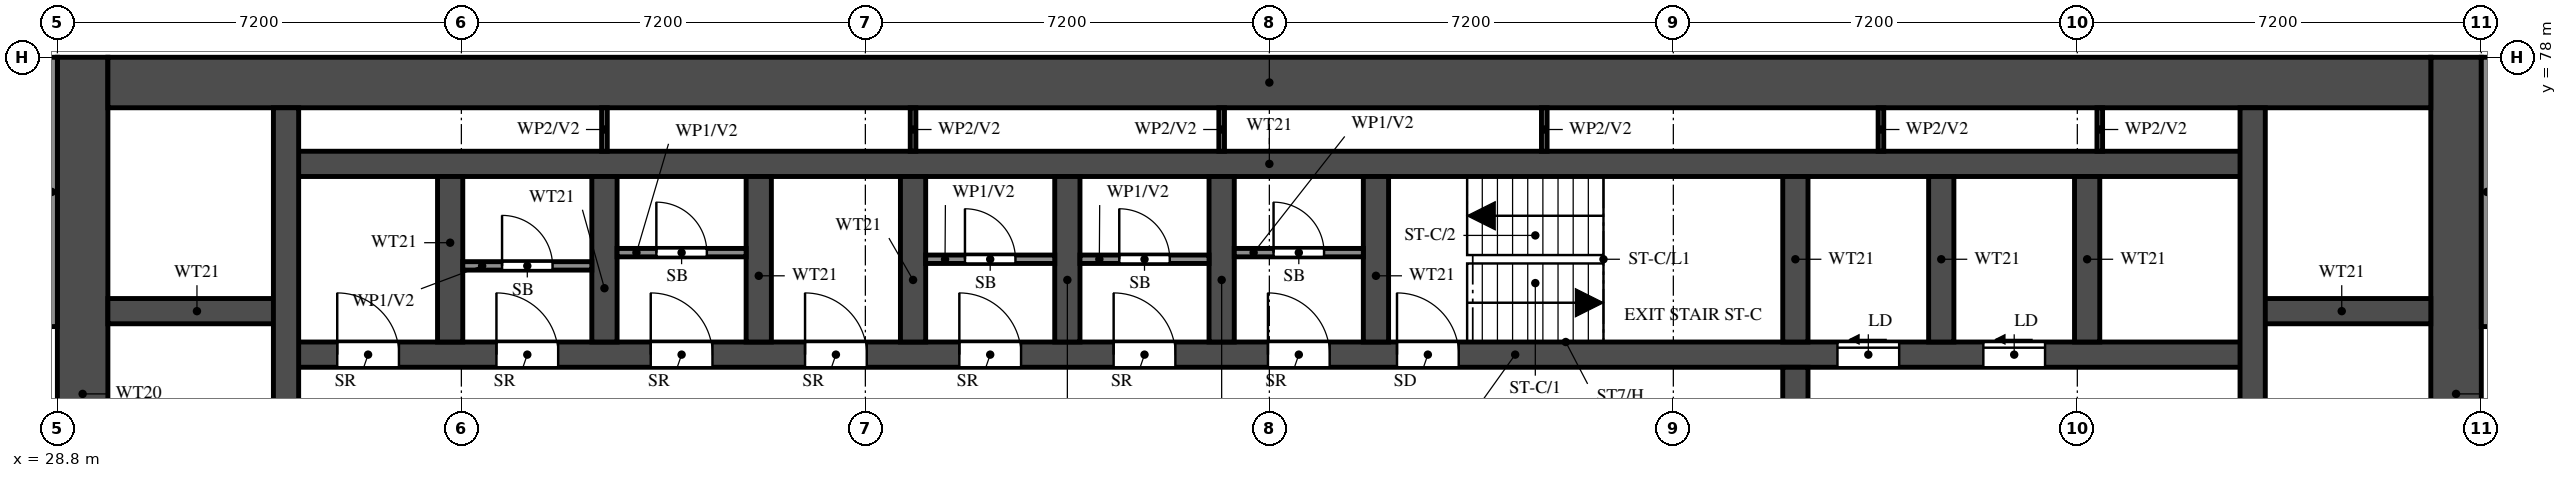
"""IFC4 building model, lengths in metres.
Left out: names, types, materials, properties, quantities, classifications, styles, units other than length and angle.
Written with IfcOpenShell. Run it as: python <this file> out.ifc"""

import sys

from ifc_helpers import new_model, si_unit, direction, frame, frame_2d, origin, place, context, subcontext, project, spatial, rectangle, extrude, element, fill, save


model = new_model("IFC4")
c1 = context("Model", 3, precision=1e-05, world=origin(), true_north=direction((0.0, 1.0)))
c2 = subcontext(c1, "Body", "Model", "MODEL_VIEW")
j1 = project(units=[si_unit("LENGTHUNIT", "METRE"), si_unit("PLANEANGLEUNIT", "RADIAN")], contexts=[c1])
p1 = place(None, origin())
s1 = spatial("IfcSite", under=j1, at=p1, CompositionType="ELEMENT")
p2 = place(p1, origin())
s2 = spatial("IfcBuilding", under=s1, at=p2, CompositionType="ELEMENT")
p3 = place(p2, frame((0.0, 0.0, 41.0)))
s3 = spatial("IfcBuildingStorey", under=s2, at=p3, CompositionType="ELEMENT", Elevation=41.0)
for number, where, z_axis, x_axis in (
    (1, (29.25, 66.0, 0.0), (0.0, 0.0, 1.0), (0.0, 1.0, 0.0)),
    (2, (71.55, 66.0, 0.0), (0.0, 0.0, 1.0), (0.0, 1.0, 0.0)),
):
    element("IfcWall", number, at=place(p3, frame(where, z_axis=z_axis, x_axis=x_axis)), inside=s3, PredefinedType="SHEAR", context=c2, shape_type="SweptSolid", body=[
        extrude(rectangle(XDim=12.0, YDim=0.9, at=frame_2d((6.0, 0.0))), origin(), (0.0, 0.0, 1.0), 3.18),
    ])
p4 = place(p3, frame((29.7, 77.55, 0.0), z_axis=(0.0, 0.0, 1.0), x_axis=(1.0, 0.0, 0.0)))
e3 = element("IfcWall", 3, at=p4, inside=s3, PredefinedType="SHEAR", context=c2, shape_type="SweptSolid", body=[
    extrude(rectangle(XDim=41.4, YDim=0.9, at=frame_2d((20.7, 0.0))), origin(), (0.0, 0.0, 1.0), 3.18),
])
p5 = place(p3, frame((32.875, 72.7, 0.0), z_axis=(0.0, 0.0, 1.0), x_axis=(1.0, 0.0, 0.0)))
e4 = element("IfcWall", 4, at=p5, inside=s3, PredefinedType="SHEAR", context=c2, shape_type="SweptSolid", body=[
    extrude(rectangle(XDim=35.05, YDim=0.45, at=frame_2d((17.525, 0.0))), origin(), (0.0, 0.0, 1.0), 3.18),
])
p6 = place(p5, frame((19.8, 0.0, 0.0)))
e5 = element("IfcOpeningElement", 5, at=p6, cuts=e4, PredefinedType="OPENING", context=c2, shape_type="SweptSolid", body=[
    extrude(rectangle(XDim=1.1, YDim=2.1, at=frame_2d((0.55, 1.05))), frame((0.0, 0.235, 0.0), z_axis=(0.0, -1.0, 0.0), x_axis=(1.0, 0.0, 0.0)), (0.0, 0.0, 1.0), 0.47),
])
p7 = place(p5, frame((27.65, 0.0, 0.0)))
e6 = element("IfcOpeningElement", 6, at=p7, cuts=e4, PredefinedType="OPENING", context=c2, shape_type="SweptSolid", body=[
    extrude(rectangle(XDim=1.1, YDim=2.1, at=frame_2d((0.55, 1.05))), frame((0.0, 0.235, 0.0), z_axis=(0.0, -1.0, 0.0), x_axis=(1.0, 0.0, 0.0)), (0.0, 0.0, 1.0), 0.47),
])
p8 = place(p5, frame((30.25, 0.0, 0.0)))
e7 = element("IfcOpeningElement", 7, at=p8, cuts=e4, PredefinedType="OPENING", context=c2, shape_type="SweptSolid", body=[
    extrude(rectangle(XDim=1.1, YDim=2.1, at=frame_2d((0.55, 1.05))), frame((0.0, 0.235, 0.0), z_axis=(0.0, -1.0, 0.0), x_axis=(1.0, 0.0, 0.0)), (0.0, 0.0, 1.0), 0.47),
])
p9 = place(p5, frame((3.75, 0.0, 0.0)))
e8 = element("IfcOpeningElement", 8, at=p9, cuts=e4, PredefinedType="OPENING", context=c2, shape_type="SweptSolid", body=[
    extrude(rectangle(XDim=1.1, YDim=2.1, at=frame_2d((0.55, 1.05))), frame((0.0, 0.235, 0.0), z_axis=(0.0, -1.0, 0.0), x_axis=(1.0, 0.0, 0.0)), (0.0, 0.0, 1.0), 0.47),
])
p10 = place(p5, frame((6.5, 0.0, 0.0)))
e9 = element("IfcOpeningElement", 9, at=p10, cuts=e4, PredefinedType="OPENING", context=c2, shape_type="SweptSolid", body=[
    extrude(rectangle(XDim=1.1, YDim=2.1, at=frame_2d((0.55, 1.05))), frame((0.0, 0.235, 0.0), z_axis=(0.0, -1.0, 0.0), x_axis=(1.0, 0.0, 0.0)), (0.0, 0.0, 1.0), 0.47),
])
p11 = place(p5, frame((9.25, 0.0, 0.0)))
e10 = element("IfcOpeningElement", 10, at=p11, cuts=e4, PredefinedType="OPENING", context=c2, shape_type="SweptSolid", body=[
    extrude(rectangle(XDim=1.1, YDim=2.1, at=frame_2d((0.55, 1.05))), frame((0.0, 0.235, 0.0), z_axis=(0.0, -1.0, 0.0), x_axis=(1.0, 0.0, 0.0)), (0.0, 0.0, 1.0), 0.47),
])
p12 = place(p5, frame((12.0, 0.0, 0.0)))
e11 = element("IfcOpeningElement", 11, at=p12, cuts=e4, PredefinedType="OPENING", context=c2, shape_type="SweptSolid", body=[
    extrude(rectangle(XDim=1.1, YDim=2.1, at=frame_2d((0.55, 1.05))), frame((0.0, 0.235, 0.0), z_axis=(0.0, -1.0, 0.0), x_axis=(1.0, 0.0, 0.0)), (0.0, 0.0, 1.0), 0.47),
])
p13 = place(p5, frame((14.75, 0.0, 0.0)))
e12 = element("IfcOpeningElement", 12, at=p13, cuts=e4, PredefinedType="OPENING", context=c2, shape_type="SweptSolid", body=[
    extrude(rectangle(XDim=1.1, YDim=2.1, at=frame_2d((0.55, 1.05))), frame((0.0, 0.235, 0.0), z_axis=(0.0, -1.0, 0.0), x_axis=(1.0, 0.0, 0.0)), (0.0, 0.0, 1.0), 0.47),
])
p14 = place(p5, frame((17.5, 0.0, 0.0)))
e13 = element("IfcOpeningElement", 13, at=p14, cuts=e4, PredefinedType="OPENING", context=c2, shape_type="SweptSolid", body=[
    extrude(rectangle(XDim=1.1, YDim=2.1, at=frame_2d((0.55, 1.05))), frame((0.0, 0.235, 0.0), z_axis=(0.0, -1.0, 0.0), x_axis=(1.0, 0.0, 0.0)), (0.0, 0.0, 1.0), 0.47),
])
p15 = place(p5, frame((0.913, 0.0, 0.0)))
e14 = element("IfcOpeningElement", 14, at=p15, cuts=e4, PredefinedType="OPENING", context=c2, shape_type="SweptSolid", body=[
    extrude(rectangle(XDim=1.1, YDim=2.1, at=frame_2d((0.55, 1.05))), frame((0.0, 0.235, 0.0), z_axis=(0.0, -1.0, 0.0), x_axis=(1.0, 0.0, 0.0)), (0.0, 0.0, 1.0), 0.47),
])
p16 = place(p3, frame((32.875, 76.1, 0.0), z_axis=(0.0, 0.0, 1.0), x_axis=(1.0, 0.0, 0.0)))
e15 = element("IfcWall", 15, at=p16, inside=s3, PredefinedType="SHEAR", context=c2, shape_type="SweptSolid", body=[
    extrude(rectangle(XDim=35.05, YDim=0.45, at=frame_2d((17.525, 0.0))), origin(), (0.0, 0.0, 1.0), 3.18),
])
for number, where, z_axis, x_axis in (
    (16, (29.7, 73.475, 0.0), (0.0, 0.0, 1.0), (1.0, 0.0, 0.0)),
    (17, (67.925, 73.475, 0.0), (0.0, 0.0, 1.0), (1.0, 0.0, 0.0)),
):
    element("IfcWall", number, at=place(p3, frame(where, z_axis=z_axis, x_axis=x_axis)), inside=s3, PredefinedType="SHEAR", context=c2, shape_type="SweptSolid", body=[
        extrude(rectangle(XDim=3.175, YDim=0.45, at=frame_2d((1.587, 0.0))), origin(), (0.0, 0.0, 1.0), 3.18),
    ])
p17 = place(p3, frame((32.875, 66.45, 0.0), z_axis=(0.0, 0.0, 1.0), x_axis=(0.0, 1.0, 0.0)))
e18 = element("IfcWall", 18, at=p17, inside=s3, PredefinedType="SHEAR", context=c2, shape_type="SweptSolid", body=[
    extrude(rectangle(XDim=10.65, YDim=0.45, at=frame_2d((5.325, 0.0))), origin(), (0.0, 0.0, 1.0), 3.18),
])
p18 = place(p3, frame((67.925, 66.45, 0.0), z_axis=(0.0, 0.0, 1.0), x_axis=(0.0, 1.0, 0.0)))
e19 = element("IfcWall", 19, at=p18, inside=s3, PredefinedType="SHEAR", context=c2, shape_type="SweptSolid", body=[
    extrude(rectangle(XDim=10.65, YDim=0.45, at=frame_2d((5.325, 0.0))), origin(), (0.0, 0.0, 1.0), 3.18),
])
p19 = place(p18, frame((0.15, 0.0, 0.0)))
e20 = element("IfcOpeningElement", 20, at=p19, cuts=e19, PredefinedType="OPENING", context=c2, shape_type="SweptSolid", body=[
    extrude(rectangle(XDim=1.1, YDim=2.1, at=frame_2d((0.55, 1.05))), frame((0.0, 0.235, 0.0), z_axis=(0.0, -1.0, 0.0), x_axis=(1.0, 0.0, 0.0)), (0.0, 0.0, 1.0), 0.47),
])
p20 = place(p3, frame((59.775, 66.45, 0.0), z_axis=(0.0, 0.0, 1.0), x_axis=(0.0, 1.0, 0.0)))
e21 = element("IfcWall", 21, at=p20, inside=s3, PredefinedType="SHEAR", context=c2, shape_type="SweptSolid", body=[
    extrude(rectangle(XDim=6.025, YDim=0.45, at=frame_2d((3.013, 0.0))), origin(), (0.0, 0.0, 1.0), 3.18),
])
p21 = place(p20, frame((3.85, 0.0, 0.0)))
e22 = element("IfcOpeningElement", 22, at=p21, cuts=e21, PredefinedType="OPENING", context=c2, shape_type="SweptSolid", body=[
    extrude(rectangle(XDim=1.2, YDim=2.1, at=frame_2d((0.6, 1.05))), frame((0.0, 0.235, 0.0), z_axis=(0.0, -1.0, 0.0), x_axis=(1.0, 0.0, 0.0)), (0.0, 0.0, 1.0), 0.47),
])
for number, where, z_axis, x_axis in (
    (23, (59.775, 72.925, 0.0), (0.0, 0.0, 1.0), (0.0, 1.0, 0.0)),
    (24, (35.8, 72.925, 0.0), (0.0, 0.0, 1.0), (0.0, 1.0, 0.0)),
    (25, (38.55, 72.925, 0.0), (0.0, 0.0, 1.0), (0.0, 1.0, 0.0)),
    (26, (41.3, 72.925, 0.0), (0.0, 0.0, 1.0), (0.0, 1.0, 0.0)),
    (27, (44.05, 72.925, 0.0), (0.0, 0.0, 1.0), (0.0, 1.0, 0.0)),
    (28, (46.8, 72.925, 0.0), (0.0, 0.0, 1.0), (0.0, 1.0, 0.0)),
    (29, (49.55, 72.925, 0.0), (0.0, 0.0, 1.0), (0.0, 1.0, 0.0)),
    (30, (52.3, 72.925, 0.0), (0.0, 0.0, 1.0), (0.0, 1.0, 0.0)),
    (31, (62.375, 72.925, 0.0), (0.0, 0.0, 1.0), (0.0, 1.0, 0.0)),
    (32, (64.975, 72.925, 0.0), (0.0, 0.0, 1.0), (0.0, 1.0, 0.0)),
):
    element("IfcWall", number, at=place(p3, frame(where, z_axis=z_axis, x_axis=x_axis)), inside=s3, PredefinedType="SHEAR", context=c2, shape_type="SweptSolid", body=[
        extrude(rectangle(XDim=2.95, YDim=0.45, at=frame_2d((1.475, 0.0))), origin(), (0.0, 0.0, 1.0), 3.18),
    ])
p22 = place(p3, frame((36.025, 74.282, 0.0), z_axis=(0.0, 0.0, 1.0), x_axis=(1.0, 0.0, 0.0)))
e33 = element("IfcWall", 33, at=p22, inside=s3, PredefinedType="PARTITIONING", context=c2, shape_type="SweptSolid", body=[
    extrude(rectangle(XDim=2.3, YDim=0.15, at=frame_2d((1.15, 0.0))), origin(), (0.0, 0.0, 1.0), 3.18),
])
p23 = place(p22, frame((0.7, 0.0, 0.0)))
e34 = element("IfcOpeningElement", 34, at=p23, cuts=e33, PredefinedType="OPENING", context=c2, shape_type="SweptSolid", body=[
    extrude(rectangle(XDim=0.9, YDim=2.1, at=frame_2d((0.45, 1.05))), frame((0.0, 0.085, 0.0), z_axis=(0.0, -1.0, 0.0), x_axis=(1.0, 0.0, 0.0)), (0.0, 0.0, 1.0), 0.17),
])
p24 = place(p3, frame((38.775, 74.518, 0.0), z_axis=(0.0, 0.0, 1.0), x_axis=(1.0, 0.0, 0.0)))
e35 = element("IfcWall", 35, at=p24, inside=s3, PredefinedType="PARTITIONING", context=c2, shape_type="SweptSolid", body=[
    extrude(rectangle(XDim=2.3, YDim=0.15, at=frame_2d((1.15, 0.0))), origin(), (0.0, 0.0, 1.0), 3.18),
])
p25 = place(p24, frame((0.7, 0.0, 0.0)))
e36 = element("IfcOpeningElement", 36, at=p25, cuts=e35, PredefinedType="OPENING", context=c2, shape_type="SweptSolid", body=[
    extrude(rectangle(XDim=0.9, YDim=2.1, at=frame_2d((0.45, 1.05))), frame((0.0, 0.085, 0.0), z_axis=(0.0, -1.0, 0.0), x_axis=(1.0, 0.0, 0.0)), (0.0, 0.0, 1.0), 0.17),
])
p26 = place(p3, frame((44.275, 74.4, 0.0), z_axis=(0.0, 0.0, 1.0), x_axis=(1.0, 0.0, 0.0)))
e37 = element("IfcWall", 37, at=p26, inside=s3, PredefinedType="PARTITIONING", context=c2, shape_type="SweptSolid", body=[
    extrude(rectangle(XDim=2.3, YDim=0.15, at=frame_2d((1.15, 0.0))), origin(), (0.0, 0.0, 1.0), 3.18),
])
p27 = place(p26, frame((0.7, 0.0, 0.0)))
e38 = element("IfcOpeningElement", 38, at=p27, cuts=e37, PredefinedType="OPENING", context=c2, shape_type="SweptSolid", body=[
    extrude(rectangle(XDim=0.9, YDim=2.1, at=frame_2d((0.45, 1.05))), frame((0.0, 0.085, 0.0), z_axis=(0.0, -1.0, 0.0), x_axis=(1.0, 0.0, 0.0)), (0.0, 0.0, 1.0), 0.17),
])
p28 = place(p3, frame((47.025, 74.4, 0.0), z_axis=(0.0, 0.0, 1.0), x_axis=(1.0, 0.0, 0.0)))
e39 = element("IfcWall", 39, at=p28, inside=s3, PredefinedType="PARTITIONING", context=c2, shape_type="SweptSolid", body=[
    extrude(rectangle(XDim=2.3, YDim=0.15, at=frame_2d((1.15, 0.0))), origin(), (0.0, 0.0, 1.0), 3.18),
])
p29 = place(p28, frame((0.7, 0.0, 0.0)))
e40 = element("IfcOpeningElement", 40, at=p29, cuts=e39, PredefinedType="OPENING", context=c2, shape_type="SweptSolid", body=[
    extrude(rectangle(XDim=0.9, YDim=2.1, at=frame_2d((0.45, 1.05))), frame((0.0, 0.085, 0.0), z_axis=(0.0, -1.0, 0.0), x_axis=(1.0, 0.0, 0.0)), (0.0, 0.0, 1.0), 0.17),
])
p30 = place(p3, frame((49.775, 74.518, 0.0), z_axis=(0.0, 0.0, 1.0), x_axis=(1.0, 0.0, 0.0)))
e41 = element("IfcWall", 41, at=p30, inside=s3, PredefinedType="PARTITIONING", context=c2, shape_type="SweptSolid", body=[
    extrude(rectangle(XDim=2.3, YDim=0.15, at=frame_2d((1.15, 0.0))), origin(), (0.0, 0.0, 1.0), 3.18),
])
p31 = place(p30, frame((0.7, 0.0, 0.0)))
e42 = element("IfcOpeningElement", 42, at=p31, cuts=e41, PredefinedType="OPENING", context=c2, shape_type="SweptSolid", body=[
    extrude(rectangle(XDim=0.9, YDim=2.1, at=frame_2d((0.45, 1.05))), frame((0.0, 0.085, 0.0), z_axis=(0.0, -1.0, 0.0), x_axis=(1.0, 0.0, 0.0)), (0.0, 0.0, 1.0), 0.17),
])
for number, where, z_axis, x_axis in (
    (43, (38.55, 76.325, 0.0), (0.0, 0.0, 1.0), (0.0, 1.0, 0.0)),
    (44, (44.05, 76.325, 0.0), (0.0, 0.0, 1.0), (0.0, 1.0, 0.0)),
    (45, (49.55, 76.325, 0.0), (0.0, 0.0, 1.0), (0.0, 1.0, 0.0)),
    (46, (55.3, 76.325, 0.0), (0.0, 0.0, 1.0), (0.0, 1.0, 0.0)),
    (47, (61.3, 76.325, 0.0), (0.0, 0.0, 1.0), (0.0, 1.0, 0.0)),
    (48, (65.2, 76.325, 0.0), (0.0, 0.0, 1.0), (0.0, 1.0, 0.0)),
):
    element("IfcWall", number, at=place(p3, frame(where, z_axis=z_axis, x_axis=x_axis)), inside=s3, PredefinedType="PARTITIONING", context=c2, shape_type="SweptSolid", body=[
        extrude(rectangle(XDim=0.775, YDim=0.1, at=frame_2d((0.388, 0.0))), origin(), (0.0, 0.0, 1.0), 3.18),
    ])
for number, where, z_axis, x_axis in (
    (49, (28.7, 73.2, 0.0), (0.0, 0.0, 1.0), (0.0, 1.0, 0.0)),
    (50, (72.1, 73.2, 0.0), (0.0, 0.0, 1.0), (0.0, 1.0, 0.0)),
):
    element("IfcWall", number, at=place(p3, frame(where, z_axis=z_axis, x_axis=x_axis)), inside=s3, PredefinedType="SOLIDWALL", context=c2, shape_type="SweptSolid", body=[
        extrude(rectangle(XDim=4.8, YDim=0.2, at=frame_2d((2.4, 0.0))), origin(), (0.0, 0.0, 1.0), 3.18),
    ])
p32 = place(p6, origin())
e51 = element("IfcDoor", 51, at=p32, inside=s3, OperationType="SINGLE_SWING_LEFT", PredefinedType="DOOR", context=c2, shape_type="SweptSolid", body=[
    extrude(rectangle(XDim=1.1, YDim=2.1, at=frame_2d((0.55, 1.05))), frame((0.0, 0.025, 0.0), z_axis=(0.0, -1.0, 0.0), x_axis=(1.0, 0.0, 0.0)), (0.0, 0.0, 1.0), 0.05),
])
fill(e5, e51)
p33 = place(p7, origin())
e52 = element("IfcDoor", 52, at=p33, inside=s3, OperationType="SLIDING_TO_LEFT", PredefinedType="DOOR", context=c2, shape_type="SweptSolid", body=[
    extrude(rectangle(XDim=1.1, YDim=2.1, at=frame_2d((0.55, 1.05))), frame((0.0, 0.025, 0.0), z_axis=(0.0, -1.0, 0.0), x_axis=(1.0, 0.0, 0.0)), (0.0, 0.0, 1.0), 0.05),
])
fill(e6, e52)
p34 = place(p8, origin())
e53 = element("IfcDoor", 53, at=p34, inside=s3, OperationType="SLIDING_TO_LEFT", PredefinedType="DOOR", context=c2, shape_type="SweptSolid", body=[
    extrude(rectangle(XDim=1.1, YDim=2.1, at=frame_2d((0.55, 1.05))), frame((0.0, 0.025, 0.0), z_axis=(0.0, -1.0, 0.0), x_axis=(1.0, 0.0, 0.0)), (0.0, 0.0, 1.0), 0.05),
])
fill(e7, e53)
p35 = place(p9, origin())
e54 = element("IfcDoor", 54, at=p35, inside=s3, OperationType="SINGLE_SWING_LEFT", PredefinedType="DOOR", context=c2, shape_type="SweptSolid", body=[
    extrude(rectangle(XDim=1.1, YDim=2.1, at=frame_2d((0.55, 1.05))), frame((0.0, 0.025, 0.0), z_axis=(0.0, -1.0, 0.0), x_axis=(1.0, 0.0, 0.0)), (0.0, 0.0, 1.0), 0.05),
])
fill(e8, e54)
p36 = place(p23, origin())
e55 = element("IfcDoor", 55, at=p36, inside=s3, OperationType="SINGLE_SWING_LEFT", PredefinedType="DOOR", context=c2, shape_type="SweptSolid", body=[
    extrude(rectangle(XDim=0.9, YDim=2.1, at=frame_2d((0.45, 1.05))), frame((0.0, 0.025, 0.0), z_axis=(0.0, -1.0, 0.0), x_axis=(1.0, 0.0, 0.0)), (0.0, 0.0, 1.0), 0.05),
])
fill(e34, e55)
p37 = place(p10, origin())
e56 = element("IfcDoor", 56, at=p37, inside=s3, OperationType="SINGLE_SWING_LEFT", PredefinedType="DOOR", context=c2, shape_type="SweptSolid", body=[
    extrude(rectangle(XDim=1.1, YDim=2.1, at=frame_2d((0.55, 1.05))), frame((0.0, 0.025, 0.0), z_axis=(0.0, -1.0, 0.0), x_axis=(1.0, 0.0, 0.0)), (0.0, 0.0, 1.0), 0.05),
])
fill(e9, e56)
p38 = place(p25, origin())
e57 = element("IfcDoor", 57, at=p38, inside=s3, OperationType="SINGLE_SWING_LEFT", PredefinedType="DOOR", context=c2, shape_type="SweptSolid", body=[
    extrude(rectangle(XDim=0.9, YDim=2.1, at=frame_2d((0.45, 1.05))), frame((0.0, 0.025, 0.0), z_axis=(0.0, -1.0, 0.0), x_axis=(1.0, 0.0, 0.0)), (0.0, 0.0, 1.0), 0.05),
])
fill(e36, e57)
p39 = place(p11, origin())
e58 = element("IfcDoor", 58, at=p39, inside=s3, OperationType="SINGLE_SWING_LEFT", PredefinedType="DOOR", context=c2, shape_type="SweptSolid", body=[
    extrude(rectangle(XDim=1.1, YDim=2.1, at=frame_2d((0.55, 1.05))), frame((0.0, 0.025, 0.0), z_axis=(0.0, -1.0, 0.0), x_axis=(1.0, 0.0, 0.0)), (0.0, 0.0, 1.0), 0.05),
])
fill(e10, e58)
p40 = place(p12, origin())
e59 = element("IfcDoor", 59, at=p40, inside=s3, OperationType="SINGLE_SWING_LEFT", PredefinedType="DOOR", context=c2, shape_type="SweptSolid", body=[
    extrude(rectangle(XDim=1.1, YDim=2.1, at=frame_2d((0.55, 1.05))), frame((0.0, 0.025, 0.0), z_axis=(0.0, -1.0, 0.0), x_axis=(1.0, 0.0, 0.0)), (0.0, 0.0, 1.0), 0.05),
])
fill(e11, e59)
p41 = place(p27, origin())
e60 = element("IfcDoor", 60, at=p41, inside=s3, OperationType="SINGLE_SWING_RIGHT", PredefinedType="DOOR", context=c2, shape_type="SweptSolid", body=[
    extrude(rectangle(XDim=0.9, YDim=2.1, at=frame_2d((0.45, 1.05))), frame((0.0, 0.025, 0.0), z_axis=(0.0, -1.0, 0.0), x_axis=(1.0, 0.0, 0.0)), (0.0, 0.0, 1.0), 0.05),
])
fill(e38, e60)
p42 = place(p13, origin())
e61 = element("IfcDoor", 61, at=p42, inside=s3, OperationType="SINGLE_SWING_LEFT", PredefinedType="DOOR", context=c2, shape_type="SweptSolid", body=[
    extrude(rectangle(XDim=1.1, YDim=2.1, at=frame_2d((0.55, 1.05))), frame((0.0, 0.025, 0.0), z_axis=(0.0, -1.0, 0.0), x_axis=(1.0, 0.0, 0.0)), (0.0, 0.0, 1.0), 0.05),
])
fill(e12, e61)
p43 = place(p29, origin())
e62 = element("IfcDoor", 62, at=p43, inside=s3, OperationType="SINGLE_SWING_LEFT", PredefinedType="DOOR", context=c2, shape_type="SweptSolid", body=[
    extrude(rectangle(XDim=0.9, YDim=2.1, at=frame_2d((0.45, 1.05))), frame((0.0, 0.025, 0.0), z_axis=(0.0, -1.0, 0.0), x_axis=(1.0, 0.0, 0.0)), (0.0, 0.0, 1.0), 0.05),
])
fill(e40, e62)
p44 = place(p14, origin())
e63 = element("IfcDoor", 63, at=p44, inside=s3, OperationType="SINGLE_SWING_LEFT", PredefinedType="DOOR", context=c2, shape_type="SweptSolid", body=[
    extrude(rectangle(XDim=1.1, YDim=2.1, at=frame_2d((0.55, 1.05))), frame((0.0, 0.025, 0.0), z_axis=(0.0, -1.0, 0.0), x_axis=(1.0, 0.0, 0.0)), (0.0, 0.0, 1.0), 0.05),
])
fill(e13, e63)
p45 = place(p31, origin())
e64 = element("IfcDoor", 64, at=p45, inside=s3, OperationType="SINGLE_SWING_LEFT", PredefinedType="DOOR", context=c2, shape_type="SweptSolid", body=[
    extrude(rectangle(XDim=0.9, YDim=2.1, at=frame_2d((0.45, 1.05))), frame((0.0, 0.025, 0.0), z_axis=(0.0, -1.0, 0.0), x_axis=(1.0, 0.0, 0.0)), (0.0, 0.0, 1.0), 0.05),
])
fill(e42, e64)
p46 = place(p15, origin())
e65 = element("IfcDoor", 65, at=p46, inside=s3, OperationType="SINGLE_SWING_LEFT", PredefinedType="DOOR", context=c2, shape_type="SweptSolid", body=[
    extrude(rectangle(XDim=1.1, YDim=2.1, at=frame_2d((0.55, 1.05))), frame((0.0, 0.025, 0.0), z_axis=(0.0, -1.0, 0.0), x_axis=(1.0, 0.0, 0.0)), (0.0, 0.0, 1.0), 0.05),
])
fill(e14, e65)
save(model, sys.argv[1])
